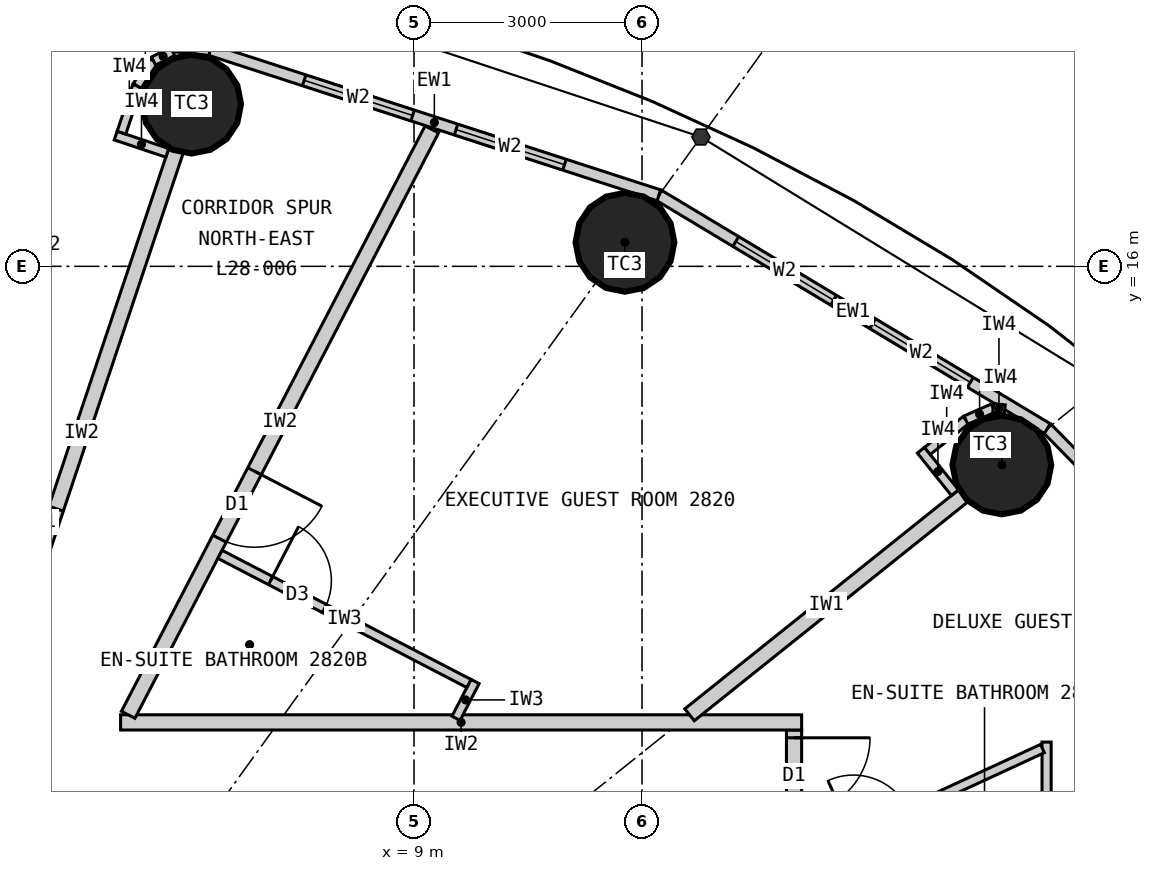
"""IFC4 building model, lengths in metres.
Left out: names, types, materials, properties, quantities, classifications, styles, units other than length and angle.
Written with IfcOpenShell. Run it as: python <this file> out.ifc"""

import sys

from ifc_helpers import new_model, si_unit, direction, frame, frame_2d, origin, origin_2d, place, context, subcontext, project, spatial, rectangle, circle, extrude, element, fill, save


model = new_model("IFC4")
c1 = context("Model", 3, precision=1e-05, world=origin(), true_north=direction((0.0, 1.0)))
c2 = subcontext(c1, "Body", "Model", "MODEL_VIEW")
j1 = project(units=[si_unit("LENGTHUNIT", "METRE"), si_unit("PLANEANGLEUNIT", "RADIAN")], contexts=[c1])
p1 = place(None, origin())
s1 = spatial("IfcSite", under=j1, at=p1, CompositionType="ELEMENT")
p2 = place(p1, origin())
s2 = spatial("IfcBuilding", under=s1, at=p2, CompositionType="ELEMENT")
p3 = place(p2, frame((0.0, 0.0, 112.2)))
s3 = spatial("IfcBuildingStorey", under=s2, at=p3, CompositionType="ELEMENT", Elevation=112.2)
for number, where, z_axis, x_axis in (
    (1, (16.734, 13.387, 0.0), (0.0, 0.0, 1.0), (1.0, 0.0, 0.0)),
    (2, (11.775, 16.316, 0.0), (0.0, 0.0, 1.0), (1.0, 0.0, 0.0)),
    (3, (6.074, 18.135, 0.0), (0.0, 0.0, 1.0), (1.0, 0.0, 0.0)),
):
    element("IfcColumn", number, at=place(p3, frame(where, z_axis=z_axis, x_axis=x_axis)), inside=s3, PredefinedType="COLUMN", context=c2, shape_type="SweptSolid", body=[
        extrude(circle(Radius=0.65, at=origin_2d()), origin(), (0.0, 0.0, 1.0), 3.3),
    ])
p4 = place(p3, frame((21.287, 9.832, 0.0), z_axis=(0.0, 0.0, 1.0), x_axis=(-0.700136650834, 0.714008872605, 0.0)))
e4 = element("IfcWall", 4, at=p4, inside=s3, PredefinedType="ELEMENTEDWALL", context=c2, shape_type="SweptSolid", body=[
    extrude(rectangle(XDim=5.649, YDim=0.15, at=frame_2d((2.825, 0.0))), origin(), (0.0, 0.0, 1.0), 3.12),
])
p5 = place(p4, frame((1.025, 0.0, 0.9)))
e5 = element("IfcOpeningElement", 5, at=p5, cuts=e4, PredefinedType="OPENING", context=c2, shape_type="SweptSolid", body=[
    extrude(rectangle(XDim=1.5, YDim=1.9, at=frame_2d((0.75, 0.95))), frame((0.0, 0.085, 0.0), z_axis=(0.0, -1.0, 0.0), x_axis=(1.0, 0.0, 0.0)), (0.0, 0.0, 1.0), 0.17),
])
p6 = place(p4, frame((3.125, 0.0, 0.9)))
e6 = element("IfcOpeningElement", 6, at=p6, cuts=e4, PredefinedType="OPENING", context=c2, shape_type="SweptSolid", body=[
    extrude(rectangle(XDim=1.5, YDim=1.9, at=frame_2d((0.75, 0.95))), frame((0.0, 0.085, 0.0), z_axis=(0.0, -1.0, 0.0), x_axis=(1.0, 0.0, 0.0)), (0.0, 0.0, 1.0), 0.17),
])
p7 = place(p3, frame((17.332, 13.866, 0.0), z_axis=(0.0, 0.0, 1.0), x_axis=(-0.857308573723, 0.514802884044, 0.0)))
e7 = element("IfcWall", 7, at=p7, inside=s3, PredefinedType="ELEMENTEDWALL", context=c2, shape_type="SweptSolid", body=[
    extrude(rectangle(XDim=5.961, YDim=0.15, at=frame_2d((2.98, 0.0))), origin(), (0.0, 0.0, 1.0), 3.12),
])
p8 = place(p7, frame((1.181, 0.0, 0.9)))
e8 = element("IfcOpeningElement", 8, at=p8, cuts=e7, PredefinedType="OPENING", context=c2, shape_type="SweptSolid", body=[
    extrude(rectangle(XDim=1.5, YDim=1.9, at=frame_2d((0.75, 0.95))), frame((0.0, 0.085, 0.0), z_axis=(0.0, -1.0, 0.0), x_axis=(1.0, 0.0, 0.0)), (0.0, 0.0, 1.0), 0.17),
])
p9 = place(p7, frame((3.281, 0.0, 0.9)))
e9 = element("IfcOpeningElement", 9, at=p9, cuts=e7, PredefinedType="OPENING", context=c2, shape_type="SweptSolid", body=[
    extrude(rectangle(XDim=1.5, YDim=1.9, at=frame_2d((0.75, 0.95))), frame((0.0, 0.085, 0.0), z_axis=(0.0, -1.0, 0.0), x_axis=(1.0, 0.0, 0.0)), (0.0, 0.0, 1.0), 0.17),
])
p10 = place(p3, frame((12.221, 16.935, 0.0), z_axis=(0.0, 0.0, 1.0), x_axis=(-0.951272691506, 0.308350881944, 0.0)))
e10 = element("IfcWall", 10, at=p10, inside=s3, PredefinedType="ELEMENTEDWALL", context=c2, shape_type="SweptSolid", body=[
    extrude(rectangle(XDim=6.211, YDim=0.15, at=frame_2d((3.105, 0.0))), origin(), (0.0, 0.0, 1.0), 3.12),
])
p11 = place(p10, frame((1.305, 0.0, 0.9)))
e11 = element("IfcOpeningElement", 11, at=p11, cuts=e10, PredefinedType="OPENING", context=c2, shape_type="SweptSolid", body=[
    extrude(rectangle(XDim=1.5, YDim=1.9, at=frame_2d((0.75, 0.95))), frame((0.0, 0.085, 0.0), z_axis=(0.0, -1.0, 0.0), x_axis=(1.0, 0.0, 0.0)), (0.0, 0.0, 1.0), 0.17),
])
p12 = place(p10, frame((3.405, 0.0, 0.9)))
e12 = element("IfcOpeningElement", 12, at=p12, cuts=e10, PredefinedType="OPENING", context=c2, shape_type="SweptSolid", body=[
    extrude(rectangle(XDim=1.5, YDim=1.9, at=frame_2d((0.75, 0.95))), frame((0.0, 0.085, 0.0), z_axis=(0.0, -1.0, 0.0), x_axis=(1.0, 0.0, 0.0)), (0.0, 0.0, 1.0), 0.17),
])
p13 = place(p3, frame((6.313, 18.85, 0.0), z_axis=(0.0, 0.0, 1.0), x_axis=(-0.994735690163, 0.102473931887, 0.0)))
e13 = element("IfcWall", 13, at=p13, inside=s3, PredefinedType="ELEMENTEDWALL", context=c2, shape_type="SweptSolid", body=[
    extrude(rectangle(XDim=6.347, YDim=0.15, at=frame_2d((3.173, 0.0))), origin(), (0.0, 0.0, 1.0), 3.12),
])
p14 = place(p13, frame((1.373, 0.0, 0.9)))
e14 = element("IfcOpeningElement", 14, at=p14, cuts=e13, PredefinedType="OPENING", context=c2, shape_type="SweptSolid", body=[
    extrude(rectangle(XDim=1.5, YDim=1.9, at=frame_2d((0.75, 0.95))), frame((0.0, 0.085, 0.0), z_axis=(0.0, -1.0, 0.0), x_axis=(1.0, 0.0, 0.0)), (0.0, 0.0, 1.0), 0.17),
])
p15 = place(p13, frame((3.473, 0.0, 0.9)))
e15 = element("IfcOpeningElement", 15, at=p15, cuts=e13, PredefinedType="OPENING", context=c2, shape_type="SweptSolid", body=[
    extrude(rectangle(XDim=1.5, YDim=1.9, at=frame_2d((0.75, 0.95))), frame((0.0, 0.085, 0.0), z_axis=(0.0, -1.0, 0.0), x_axis=(1.0, 0.0, 0.0)), (0.0, 0.0, 1.0), 0.17),
])
p16 = place(p3, frame((14.0, -9.9, 0.0), z_axis=(0.0, 0.0, 1.0), x_axis=(0.0, 1.0, 0.0)))
e16 = element("IfcWall", 16, at=p16, inside=s3, PredefinedType="PARTITIONING", context=c2, shape_type="SweptSolid", body=[
    extrude(rectangle(XDim=19.8, YDim=0.2, at=frame_2d((9.9, 0.0))), origin(), (0.0, 0.0, 1.0), 3.12),
])
p17 = place(p16, frame((3.318, 0.0, 0.0)))
e17 = element("IfcOpeningElement", 17, at=p17, cuts=e16, PredefinedType="OPENING", context=c2, shape_type="SweptSolid", body=[
    extrude(rectangle(XDim=1.0, YDim=2.2, at=frame_2d((0.5, 1.1))), frame((0.0, 0.11, 0.0), z_axis=(0.0, -1.0, 0.0), x_axis=(1.0, 0.0, 0.0)), (0.0, 0.0, 1.0), 0.22),
])
p18 = place(p16, frame((9.238, 0.0, 0.0)))
e18 = element("IfcOpeningElement", 18, at=p18, cuts=e16, PredefinedType="OPENING", context=c2, shape_type="SweptSolid", body=[
    extrude(rectangle(XDim=1.0, YDim=2.2, at=frame_2d((0.5, 1.1))), frame((0.0, 0.11, 0.0), z_axis=(0.0, -1.0, 0.0), x_axis=(1.0, 0.0, 0.0)), (0.0, 0.0, 1.0), 0.22),
])
p19 = place(p16, frame((13.742, 0.0, 0.0)))
e19 = element("IfcOpeningElement", 19, at=p19, cuts=e16, PredefinedType="OPENING", context=c2, shape_type="SweptSolid", body=[
    extrude(rectangle(XDim=1.0, YDim=2.2, at=frame_2d((0.5, 1.1))), frame((0.0, 0.11, 0.0), z_axis=(0.0, -1.0, 0.0), x_axis=(1.0, 0.0, 0.0)), (0.0, 0.0, 1.0), 0.22),
])
p20 = place(p16, frame((18.698, 0.0, 0.0)))
e20 = element("IfcOpeningElement", 20, at=p20, cuts=e16, PredefinedType="OPENING", context=c2, shape_type="SweptSolid", body=[
    extrude(rectangle(XDim=1.0, YDim=2.2, at=frame_2d((0.5, 1.1))), frame((0.0, 0.11, 0.0), z_axis=(0.0, -1.0, 0.0), x_axis=(1.0, 0.0, 0.0)), (0.0, 0.0, 1.0), 0.22),
])
p21 = place(p3, frame((5.139, 10.0, 0.0), z_axis=(0.0, 0.0, 1.0), x_axis=(1.0, 0.0, 0.0)))
e21 = element("IfcWall", 21, at=p21, inside=s3, PredefinedType="PARTITIONING", context=c2, shape_type="SweptSolid", body=[
    extrude(rectangle(XDim=8.961, YDim=0.2, at=frame_2d((4.48, 0.0))), origin(), (0.0, 0.0, 1.0), 3.12),
])
p22 = place(p3, frame((14.1, 6.512, 0.0), z_axis=(0.0, 0.0, 1.0), x_axis=(0.907833019998, 0.419331858797, 0.0)))
e22 = element("IfcWall", 22, at=p22, inside=s3, PredefinedType="PARTITIONING", context=c2, shape_type="SweptSolid", body=[
    extrude(rectangle(XDim=6.505, YDim=0.2, at=frame_2d((3.252, 0.0))), origin(), (0.0, 0.0, 1.0), 2.27),
])
p23 = place(p3, frame((12.625, 10.1, 0.0), z_axis=(0.0, 0.0, 1.0), x_axis=(0.780863644897, 0.624701503182, 0.0)))
e23 = element("IfcWall", 23, at=p23, inside=s3, PredefinedType="PARTITIONING", context=c2, shape_type="SweptSolid", body=[
    extrude(rectangle(XDim=4.612, YDim=0.2, at=frame_2d((2.306, 0.0))), origin(), (0.0, 0.0, 1.0), 2.37),
])
p24 = place(p3, frame((5.239, 10.1, 0.0), z_axis=(0.0, 0.0, 1.0), x_axis=(0.4604797896, 0.887670188398, 0.0)))
e24 = element("IfcWall", 24, at=p24, inside=s3, PredefinedType="PARTITIONING", context=c2, shape_type="SweptSolid", body=[
    extrude(rectangle(XDim=8.676, YDim=0.2, at=frame_2d((4.338, 0.0))), origin(), (0.0, 0.0, 1.0), 3.12),
])
p25 = place(p24, frame((2.61, 0.0, 0.0)))
e25 = element("IfcOpeningElement", 25, at=p25, cuts=e24, PredefinedType="OPENING", context=c2, shape_type="SweptSolid", body=[
    extrude(rectangle(XDim=1.0, YDim=2.2, at=frame_2d((0.5, 1.1))), frame((0.0, 0.11, 0.0), z_axis=(0.0, -1.0, 0.0), x_axis=(1.0, 0.0, 0.0)), (0.0, 0.0, 1.0), 0.22),
])
p26 = place(p3, frame((3.383, 10.1, 0.0), z_axis=(0.0, 0.0, 1.0), x_axis=(0.317603705574, 0.948223542318, 0.0)))
e26 = element("IfcWall", 26, at=p26, inside=s3, PredefinedType="PARTITIONING", context=c2, shape_type="SweptSolid", body=[
    extrude(rectangle(XDim=7.823, YDim=0.2, at=frame_2d((3.912, 0.0))), origin(), (0.0, 0.0, 1.0), 2.37),
])
p27 = place(p26, frame((1.86, 0.0, 0.0)))
e27 = element("IfcOpeningElement", 27, at=p27, cuts=e26, PredefinedType="OPENING", context=c2, shape_type="SweptSolid", body=[
    extrude(rectangle(XDim=1.0, YDim=2.2, at=frame_2d((0.5, 1.1))), frame((0.0, 0.11, 0.0), z_axis=(0.0, -1.0, 0.0), x_axis=(1.0, 0.0, 0.0)), (0.0, 0.0, 1.0), 0.22),
])
p28 = place(p3, frame((17.323, 8.101, 0.0), z_axis=(0.0, 0.0, 1.0), x_axis=(0.0, 1.0, 0.0)))
e28 = element("IfcWall", 28, at=p28, inside=s3, PredefinedType="PARTITIONING", context=c2, shape_type="SweptSolid", body=[
    extrude(rectangle(XDim=1.64, YDim=0.12, at=frame_2d((0.82, 0.0))), origin(), (0.0, 0.0, 1.0), 3.12),
])
p29 = place(p3, frame((14.1, 8.193, 0.0), z_axis=(0.0, 0.0, 1.0), x_axis=(0.907836493557, 0.419324338628, 0.0)))
e29 = element("IfcWall", 29, at=p29, inside=s3, PredefinedType="PARTITIONING", context=c2, shape_type="SweptSolid", body=[
    extrude(rectangle(XDim=3.49, YDim=0.12, at=frame_2d((1.745, 0.0))), origin(), (0.0, 0.0, 1.0), 3.12),
])
p30 = place(p29, frame((0.75, 0.0, 0.0)))
e30 = element("IfcOpeningElement", 30, at=p30, cuts=e29, PredefinedType="OPENING", context=c2, shape_type="SweptSolid", body=[
    extrude(rectangle(XDim=0.8, YDim=2.1, at=frame_2d((0.4, 1.05))), frame((0.0, 0.07, 0.0), z_axis=(0.0, -1.0, 0.0), x_axis=(1.0, 0.0, 0.0)), (0.0, 0.0, 1.0), 0.14),
])
p31 = place(p3, frame((9.552, 10.054, 0.0), z_axis=(0.0, 0.0, 1.0), x_axis=(0.460604866949, 0.887605293215, 0.0)))
e31 = element("IfcWall", 31, at=p31, inside=s3, PredefinedType="PARTITIONING", context=c2, shape_type="SweptSolid", body=[
    extrude(rectangle(XDim=0.545, YDim=0.12, at=frame_2d((0.272, 0.0))), origin(), (0.0, 0.0, 1.0), 3.12),
])
p32 = place(p3, frame((6.447, 12.211, 0.0), z_axis=(0.0, 0.0, 1.0), x_axis=(0.887685422499, -0.460450421525, 0.0)))
e32 = element("IfcWall", 32, at=p32, inside=s3, PredefinedType="PARTITIONING", context=c2, shape_type="SweptSolid", body=[
    extrude(rectangle(XDim=3.69, YDim=0.12, at=frame_2d((1.845, 0.0))), origin(), (0.0, 0.0, 1.0), 3.12),
])
p33 = place(p32, frame((0.75, 0.0, 0.0)))
e33 = element("IfcOpeningElement", 33, at=p33, cuts=e32, PredefinedType="OPENING", context=c2, shape_type="SweptSolid", body=[
    extrude(rectangle(XDim=0.8, YDim=2.1, at=frame_2d((0.4, 1.05))), frame((0.0, 0.07, 0.0), z_axis=(0.0, -1.0, 0.0), x_axis=(1.0, 0.0, 0.0)), (0.0, 0.0, 1.0), 0.14),
])
p34 = place(p3, frame((16.117, 13.022, 0.0), z_axis=(0.0, 0.0, 1.0), x_axis=(-0.62465344249, 0.780902091677, 0.0)))
e34 = element("IfcWall", 34, at=p34, inside=s3, PredefinedType="PARTITIONING", context=c2, shape_type="SweptSolid", body=[
    extrude(rectangle(XDim=0.716, YDim=0.12, at=frame_2d((0.358, 0.0))), origin(), (0.0, 0.0, 1.0), 3.12),
])
p35 = place(p3, frame((15.754, 13.571, 0.0), z_axis=(0.0, 0.0, 1.0), x_axis=(0.780905453553, 0.624649239663, 0.0)))
e35 = element("IfcWall", 35, at=p35, inside=s3, PredefinedType="PARTITIONING", context=c2, shape_type="SweptSolid", body=[
    extrude(rectangle(XDim=0.65, YDim=0.12, at=frame_2d((0.325, 0.0))), origin(), (0.0, 0.0, 1.0), 3.12),
])
p36 = place(p3, frame((16.262, 13.977, 0.0), z_axis=(0.0, 0.0, 1.0), x_axis=(0.915985403703, 0.401211590314, 0.0)))
e36 = element("IfcWall", 36, at=p36, inside=s3, PredefinedType="PARTITIONING", context=c2, shape_type="SweptSolid", body=[
    extrude(rectangle(XDim=0.391, YDim=0.12, at=frame_2d((0.196, 0.0))), origin(), (0.0, 0.0, 1.0), 3.12),
])
p37 = place(p3, frame((16.62, 14.134, 0.0), z_axis=(0.0, 0.0, 1.0), x_axis=(0.993941871493, -0.109907033867, 0.0)))
e37 = element("IfcWall", 37, at=p37, inside=s3, PredefinedType="PARTITIONING", context=c2, shape_type="SweptSolid", body=[
    extrude(rectangle(XDim=0.153, YDim=0.12, at=frame_2d((0.077, 0.0))), origin(), (0.0, 0.0, 1.0), 3.12),
])
p38 = place(p3, frame((5.754, 17.493, 0.0), z_axis=(0.0, 0.0, 1.0), x_axis=(-0.9482389443, 0.317557718397, 0.0)))
e38 = element("IfcWall", 38, at=p38, inside=s3, PredefinedType="PARTITIONING", context=c2, shape_type="SweptSolid", body=[
    extrude(rectangle(XDim=0.716, YDim=0.12, at=frame_2d((0.358, 0.0))), origin(), (0.0, 0.0, 1.0), 3.12),
])
p39 = place(p3, frame((5.151, 17.758, 0.0), z_axis=(0.0, 0.0, 1.0), x_axis=(0.317354244456, 0.948307061835, 0.0)))
e39 = element("IfcWall", 39, at=p39, inside=s3, PredefinedType="PARTITIONING", context=c2, shape_type="SweptSolid", body=[
    extrude(rectangle(XDim=0.65, YDim=0.12, at=frame_2d((0.325, 0.0))), origin(), (0.0, 0.0, 1.0), 3.12),
])
p40 = place(p3, frame((5.357, 18.375, 0.0), z_axis=(0.0, 0.0, 1.0), x_axis=(0.552249752128, 0.833678721856, 0.0)))
e40 = element("IfcWall", 40, at=p40, inside=s3, PredefinedType="PARTITIONING", context=c2, shape_type="SweptSolid", body=[
    extrude(rectangle(XDim=0.391, YDim=0.12, at=frame_2d((0.196, 0.0))), origin(), (0.0, 0.0, 1.0), 3.12),
])
p41 = place(p3, frame((5.573, 18.701, 0.0), z_axis=(0.0, 0.0, 1.0), x_axis=(0.895295561985, 0.445472621707, 0.0)))
e41 = element("IfcWall", 41, at=p41, inside=s3, PredefinedType="PARTITIONING", context=c2, shape_type="SweptSolid", body=[
    extrude(rectangle(XDim=0.281, YDim=0.12, at=frame_2d((0.14, 0.0))), origin(), (0.0, 0.0, 1.0), 3.12),
])
p42 = place(p8, origin())
e42 = element("IfcWindow", 42, at=p42, inside=s3, PartitioningType="SINGLE_PANEL", PredefinedType="WINDOW", context=c2, shape_type="SweptSolid", body=[
    extrude(rectangle(XDim=1.5, YDim=1.9, at=frame_2d((0.75, 0.95))), frame((0.0, 0.03, 0.0), z_axis=(0.0, -1.0, 0.0), x_axis=(1.0, 0.0, 0.0)), (0.0, 0.0, 1.0), 0.06),
])
fill(e8, e42)
p43 = place(p9, origin())
e43 = element("IfcWindow", 43, at=p43, inside=s3, PartitioningType="SINGLE_PANEL", PredefinedType="WINDOW", context=c2, shape_type="SweptSolid", body=[
    extrude(rectangle(XDim=1.5, YDim=1.9, at=frame_2d((0.75, 0.95))), frame((0.0, 0.03, 0.0), z_axis=(0.0, -1.0, 0.0), x_axis=(1.0, 0.0, 0.0)), (0.0, 0.0, 1.0), 0.06),
])
fill(e9, e43)
p44 = place(p11, origin())
e44 = element("IfcWindow", 44, at=p44, inside=s3, PartitioningType="SINGLE_PANEL", PredefinedType="WINDOW", context=c2, shape_type="SweptSolid", body=[
    extrude(rectangle(XDim=1.5, YDim=1.9, at=frame_2d((0.75, 0.95))), frame((0.0, 0.03, 0.0), z_axis=(0.0, -1.0, 0.0), x_axis=(1.0, 0.0, 0.0)), (0.0, 0.0, 1.0), 0.06),
])
fill(e11, e44)
p45 = place(p12, origin())
e45 = element("IfcWindow", 45, at=p45, inside=s3, PartitioningType="SINGLE_PANEL", PredefinedType="WINDOW", context=c2, shape_type="SweptSolid", body=[
    extrude(rectangle(XDim=1.5, YDim=1.9, at=frame_2d((0.75, 0.95))), frame((0.0, 0.03, 0.0), z_axis=(0.0, -1.0, 0.0), x_axis=(1.0, 0.0, 0.0)), (0.0, 0.0, 1.0), 0.06),
])
fill(e12, e45)
p46 = place(p27, origin())
e46 = element("IfcDoor", 46, at=p46, inside=s3, OperationType="SINGLE_SWING_LEFT", PredefinedType="DOOR", context=c2, shape_type="SweptSolid", body=[
    extrude(rectangle(XDim=1.0, YDim=2.2, at=frame_2d((0.5, 1.1))), frame((0.0, 0.025, 0.0), z_axis=(0.0, -1.0, 0.0), x_axis=(1.0, 0.0, 0.0)), (0.0, 0.0, 1.0), 0.05),
])
fill(e27, e46)
p47 = place(p20, origin())
e47 = element("IfcDoor", 47, at=p47, inside=s3, OperationType="SINGLE_SWING_RIGHT", PredefinedType="DOOR", context=c2, shape_type="SweptSolid", body=[
    extrude(rectangle(XDim=1.0, YDim=2.2, at=frame_2d((0.5, 1.1))), frame((0.0, 0.025, 0.0), z_axis=(0.0, -1.0, 0.0), x_axis=(1.0, 0.0, 0.0)), (0.0, 0.0, 1.0), 0.05),
])
fill(e20, e47)
p48 = place(p33, origin())
e48 = element("IfcDoor", 48, at=p48, inside=s3, OperationType="SINGLE_SWING_LEFT", PredefinedType="DOOR", context=c2, shape_type="SweptSolid", body=[
    extrude(rectangle(XDim=0.8, YDim=2.1, at=frame_2d((0.4, 1.05))), frame((0.0, 0.025, 0.0), z_axis=(0.0, -1.0, 0.0), x_axis=(1.0, 0.0, 0.0)), (0.0, 0.0, 1.0), 0.05),
])
fill(e33, e48)
p49 = place(p25, origin())
e49 = element("IfcDoor", 49, at=p49, inside=s3, OperationType="SINGLE_SWING_RIGHT", PredefinedType="DOOR", context=c2, shape_type="SweptSolid", body=[
    extrude(rectangle(XDim=1.0, YDim=2.2, at=frame_2d((0.5, 1.1))), frame((0.0, 0.025, 0.0), z_axis=(0.0, -1.0, 0.0), x_axis=(1.0, 0.0, 0.0)), (0.0, 0.0, 1.0), 0.05),
])
fill(e25, e49)
save(model, sys.argv[1])
